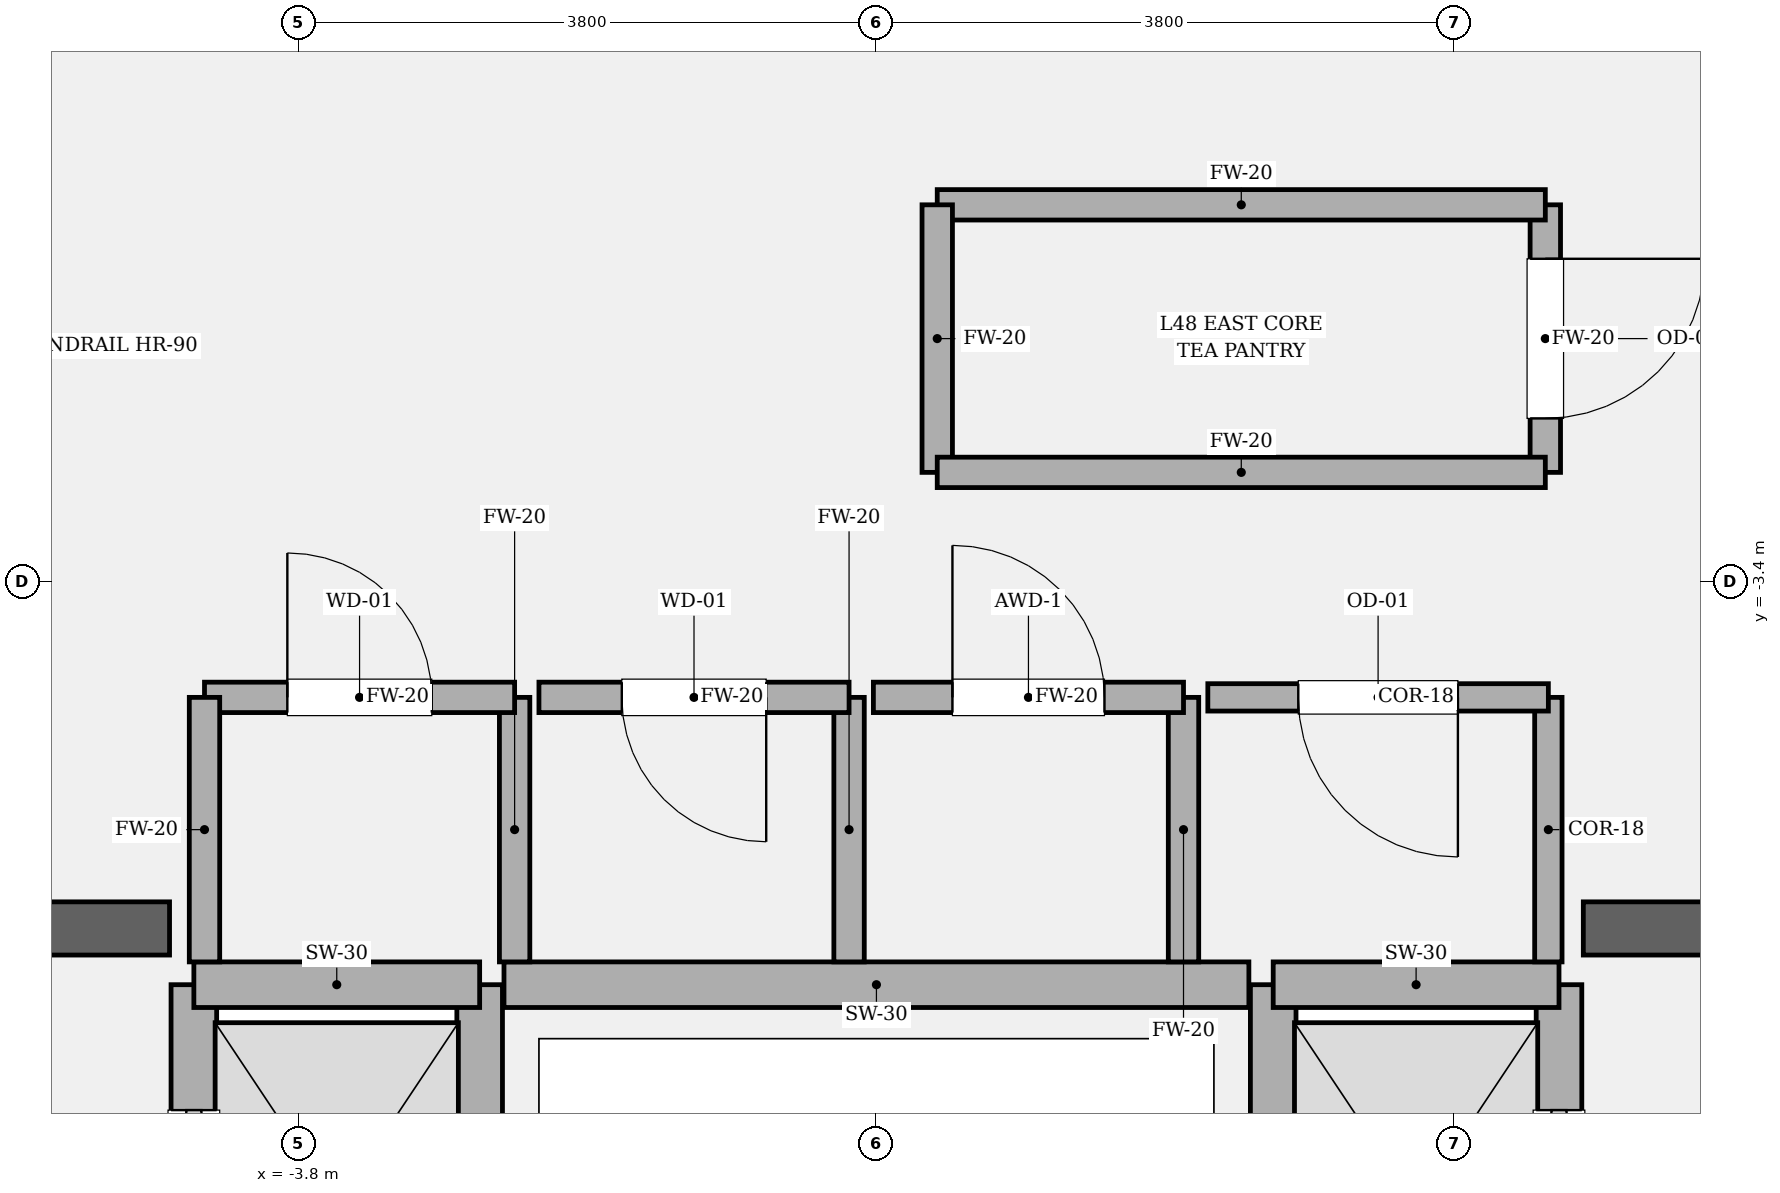
"""IFC4 building model, lengths in metres.
Left out: names, types, materials, properties, quantities, classifications, styles, units other than length and angle.
Written with IfcOpenShell. Run it as: python <this file> out.ifc"""

import sys

from ifc_helpers import new_model, si_unit, direction, frame, frame_2d, origin, place, context, subcontext, project, spatial, rectangle, extrude, element, fill, save


model = new_model("IFC4")
c1 = context("Model", 3, precision=1e-05, world=origin(), true_north=direction((0.0, 1.0)))
c2 = subcontext(c1, "Body", "Model", "MODEL_VIEW")
j1 = project(units=[si_unit("LENGTHUNIT", "METRE"), si_unit("PLANEANGLEUNIT", "RADIAN")], contexts=[c1])
p1 = place(None, origin())
s1 = spatial("IfcSite", under=j1, at=p1, CompositionType="ELEMENT")
p2 = place(p1, origin())
s2 = spatial("IfcBuilding", under=s1, at=p2, CompositionType="ELEMENT")
p3 = place(p2, frame((0.0, 0.0, 204.6)))
s3 = spatial("IfcBuildingStorey", under=s2, at=p3, CompositionType="ELEMENT", Elevation=204.6)
p4 = place(p3, frame((-9.875, -5.68, 0.0), z_axis=(0.0, 0.0, 1.0), x_axis=(1.0, 0.0, 0.0)))
e1 = element("IfcWall", 1, at=p4, inside=s3, PredefinedType="SOLIDWALL", context=c2, shape_type="SweptSolid", body=[
    extrude(rectangle(XDim=5.225, YDim=0.35, at=frame_2d((2.613, 0.0))), origin(), (0.0, 0.0, 1.0), 4.05),
])
p5 = place(p4, frame((1.335, 0.0, 0.0)))
e2 = element("IfcOpeningElement", 2, at=p5, cuts=e1, PredefinedType="OPENING", context=c2, shape_type="SweptSolid", body=[
    extrude(rectangle(XDim=1.18, YDim=2.2, at=frame_2d((0.59, 1.1))), frame((0.0, 0.185, 0.0), z_axis=(0.0, -1.0, 0.0), x_axis=(1.0, 0.0, 0.0)), (0.0, 0.0, 1.0), 0.37),
])
p6 = place(p3, frame((4.65, -5.68, 0.0), z_axis=(0.0, 0.0, 1.0), x_axis=(1.0, 0.0, 0.0)))
e3 = element("IfcWall", 3, at=p6, inside=s3, PredefinedType="SOLIDWALL", context=c2, shape_type="SweptSolid", body=[
    extrude(rectangle(XDim=5.225, YDim=0.35, at=frame_2d((2.613, 0.0))), origin(), (0.0, 0.0, 1.0), 4.05),
])
p7 = place(p6, frame((2.71, 0.0, 0.0)))
e4 = element("IfcOpeningElement", 4, at=p7, cuts=e3, PredefinedType="OPENING", context=c2, shape_type="SweptSolid", body=[
    extrude(rectangle(XDim=1.18, YDim=2.2, at=frame_2d((0.59, 1.1))), frame((0.0, 0.185, 0.0), z_axis=(0.0, -1.0, 0.0), x_axis=(1.0, 0.0, 0.0)), (0.0, 0.0, 1.0), 0.37),
])
p8 = place(p3, frame((-4.49, -8.82, 0.0), z_axis=(0.0, 0.0, 1.0), x_axis=(0.0, 1.0, 0.0)))
e5 = element("IfcWall", 5, at=p8, inside=s3, PredefinedType="SOLIDWALL", context=c2, shape_type="SweptSolid", body=[
    extrude(rectangle(XDim=2.77, YDim=0.3, at=frame_2d((1.385, 0.0))), origin(), (0.0, 0.0, 1.0), 3.83),
])
p9 = place(p8, frame((0.825, 0.0, 0.0)))
e6 = element("IfcOpeningElement", 6, at=p9, cuts=e5, PredefinedType="OPENING", context=c2, shape_type="SweptSolid", body=[
    extrude(rectangle(XDim=1.12, YDim=2.25, at=frame_2d((0.56, 1.125))), frame((0.0, 0.16, 0.0), z_axis=(0.0, -1.0, 0.0), x_axis=(1.0, 0.0, 0.0)), (0.0, 0.0, 1.0), 0.32),
])
p10 = place(p3, frame((-2.61, -8.82, 0.0), z_axis=(0.0, 0.0, 1.0), x_axis=(0.0, 1.0, 0.0)))
e7 = element("IfcWall", 7, at=p10, inside=s3, PredefinedType="SOLIDWALL", context=c2, shape_type="SweptSolid", body=[
    extrude(rectangle(XDim=2.77, YDim=0.3, at=frame_2d((1.385, 0.0))), origin(), (0.0, 0.0, 1.0), 3.83),
])
p11 = place(p3, frame((-4.49, -6.05, 0.0), z_axis=(0.0, 0.0, 1.0), x_axis=(1.0, 0.0, 0.0)))
e8 = element("IfcWall", 8, at=p11, inside=s3, PredefinedType="SOLIDWALL", context=c2, shape_type="SweptSolid", body=[
    extrude(rectangle(XDim=1.88, YDim=0.3, at=frame_2d((0.94, 0.0))), origin(), (0.0, 0.0, 1.0), 3.83),
])
p12 = place(p3, frame((4.49, -8.82, 0.0), z_axis=(0.0, 0.0, 1.0), x_axis=(0.0, 1.0, 0.0)))
e9 = element("IfcWall", 9, at=p12, inside=s3, PredefinedType="SOLIDWALL", context=c2, shape_type="SweptSolid", body=[
    extrude(rectangle(XDim=2.77, YDim=0.3, at=frame_2d((1.385, 0.0))), origin(), (0.0, 0.0, 1.0), 3.83),
])
p13 = place(p12, frame((0.825, 0.0, 0.0)))
e10 = element("IfcOpeningElement", 10, at=p13, cuts=e9, PredefinedType="OPENING", context=c2, shape_type="SweptSolid", body=[
    extrude(rectangle(XDim=1.12, YDim=2.25, at=frame_2d((0.56, 1.125))), frame((0.0, 0.16, 0.0), z_axis=(0.0, -1.0, 0.0), x_axis=(1.0, 0.0, 0.0)), (0.0, 0.0, 1.0), 0.32),
])
p14 = place(p3, frame((2.61, -8.82, 0.0), z_axis=(0.0, 0.0, 1.0), x_axis=(0.0, 1.0, 0.0)))
e11 = element("IfcWall", 11, at=p14, inside=s3, PredefinedType="SOLIDWALL", context=c2, shape_type="SweptSolid", body=[
    extrude(rectangle(XDim=2.77, YDim=0.3, at=frame_2d((1.385, 0.0))), origin(), (0.0, 0.0, 1.0), 3.83),
])
p15 = place(p3, frame((2.61, -6.05, 0.0), z_axis=(0.0, 0.0, 1.0), x_axis=(1.0, 0.0, 0.0)))
e12 = element("IfcWall", 12, at=p15, inside=s3, PredefinedType="SOLIDWALL", context=c2, shape_type="SweptSolid", body=[
    extrude(rectangle(XDim=1.88, YDim=0.3, at=frame_2d((0.94, 0.0))), origin(), (0.0, 0.0, 1.0), 3.83),
])
p16 = place(p3, frame((-2.45, -6.05, 0.0), z_axis=(0.0, 0.0, 1.0), x_axis=(1.0, 0.0, 0.0)))
e13 = element("IfcWall", 13, at=p16, inside=s3, PredefinedType="SOLIDWALL", context=c2, shape_type="SweptSolid", body=[
    extrude(rectangle(XDim=4.9, YDim=0.3, at=frame_2d((2.45, 0.0))), origin(), (0.0, 0.0, 1.0), 3.83),
])
p17 = place(p3, frame((-2.38, -5.9, 0.0), z_axis=(0.0, 0.0, 1.0), x_axis=(0.0, 1.0, 0.0)))
e14 = element("IfcWall", 14, at=p17, inside=s3, PredefinedType="SOLIDWALL", context=c2, shape_type="SweptSolid", body=[
    extrude(rectangle(XDim=1.74, YDim=0.2, at=frame_2d((0.87, 0.0))), origin(), (0.0, 0.0, 1.0), 3.83),
])
p18 = place(p3, frame((-2.38, -4.16, 0.0), z_axis=(0.0, 0.0, 1.0), x_axis=(-1.0, 0.0, 0.0)))
e15 = element("IfcWall", 15, at=p18, inside=s3, PredefinedType="SOLIDWALL", context=c2, shape_type="SweptSolid", body=[
    extrude(rectangle(XDim=2.04, YDim=0.2, at=frame_2d((1.02, 0.0))), origin(), (0.0, 0.0, 1.0), 3.83),
])
p19 = place(p18, frame((0.545, 0.0, 0.0)))
e16 = element("IfcOpeningElement", 16, at=p19, cuts=e15, PredefinedType="OPENING", context=c2, shape_type="SweptSolid", body=[
    extrude(rectangle(XDim=0.95, YDim=2.15, at=frame_2d((0.475, 1.075))), frame((0.0, 0.11, 0.0), z_axis=(0.0, -1.0, 0.0), x_axis=(1.0, 0.0, 0.0)), (0.0, 0.0, 1.0), 0.22),
])
for number, where, z_axis, x_axis in (
    (17, (-4.42, -4.16, 0.0), (0.0, 0.0, 1.0), (0.0, -1.0, 0.0)),
    (18, (-0.18, -5.9, 0.0), (0.0, 0.0, 1.0), (0.0, 1.0, 0.0)),
):
    element("IfcWall", number, at=place(p3, frame(where, z_axis=z_axis, x_axis=x_axis)), inside=s3, PredefinedType="SOLIDWALL", context=c2, shape_type="SweptSolid", body=[
        extrude(rectangle(XDim=1.74, YDim=0.2, at=frame_2d((0.87, 0.0))), origin(), (0.0, 0.0, 1.0), 3.83),
    ])
p20 = place(p3, frame((-0.18, -4.16, 0.0), z_axis=(0.0, 0.0, 1.0), x_axis=(-1.0, 0.0, 0.0)))
e19 = element("IfcWall", 19, at=p20, inside=s3, PredefinedType="SOLIDWALL", context=c2, shape_type="SweptSolid", body=[
    extrude(rectangle(XDim=2.04, YDim=0.2, at=frame_2d((1.02, 0.0))), origin(), (0.0, 0.0, 1.0), 3.83),
])
p21 = place(p20, frame((0.545, 0.0, 0.0)))
e20 = element("IfcOpeningElement", 20, at=p21, cuts=e19, PredefinedType="OPENING", context=c2, shape_type="SweptSolid", body=[
    extrude(rectangle(XDim=0.95, YDim=2.15, at=frame_2d((0.475, 1.075))), frame((0.0, 0.11, 0.0), z_axis=(0.0, -1.0, 0.0), x_axis=(1.0, 0.0, 0.0)), (0.0, 0.0, 1.0), 0.22),
])
p22 = place(p3, frame((2.02, -5.9, 0.0), z_axis=(0.0, 0.0, 1.0), x_axis=(0.0, 1.0, 0.0)))
e21 = element("IfcWall", 21, at=p22, inside=s3, PredefinedType="SOLIDWALL", context=c2, shape_type="SweptSolid", body=[
    extrude(rectangle(XDim=1.74, YDim=0.2, at=frame_2d((0.87, 0.0))), origin(), (0.0, 0.0, 1.0), 3.83),
])
p23 = place(p3, frame((2.02, -4.16, 0.0), z_axis=(0.0, 0.0, 1.0), x_axis=(-1.0, 0.0, 0.0)))
e22 = element("IfcWall", 22, at=p23, inside=s3, PredefinedType="SOLIDWALL", context=c2, shape_type="SweptSolid", body=[
    extrude(rectangle(XDim=2.04, YDim=0.2, at=frame_2d((1.02, 0.0))), origin(), (0.0, 0.0, 1.0), 3.83),
])
p24 = place(p23, frame((0.52, 0.0, 0.0)))
e23 = element("IfcOpeningElement", 23, at=p24, cuts=e22, PredefinedType="OPENING", context=c2, shape_type="SweptSolid", body=[
    extrude(rectangle(XDim=1.0, YDim=2.15, at=frame_2d((0.5, 1.075))), frame((0.0, 0.11, 0.0), z_axis=(0.0, -1.0, 0.0), x_axis=(1.0, 0.0, 0.0)), (0.0, 0.0, 1.0), 0.22),
])
p25 = place(p3, frame((4.42, -5.9, 0.0), z_axis=(0.0, 0.0, 1.0), x_axis=(0.0, 1.0, 0.0)))
e24 = element("IfcWall", 24, at=p25, inside=s3, PredefinedType="PARTITIONING", context=c2, shape_type="SweptSolid", body=[
    extrude(rectangle(XDim=1.74, YDim=0.18, at=frame_2d((0.87, 0.0))), origin(), (0.0, 0.0, 1.0), 3.83),
])
p26 = place(p3, frame((4.42, -4.16, 0.0), z_axis=(0.0, 0.0, 1.0), x_axis=(-1.0, 0.0, 0.0)))
e25 = element("IfcWall", 25, at=p26, inside=s3, PredefinedType="PARTITIONING", context=c2, shape_type="SweptSolid", body=[
    extrude(rectangle(XDim=2.24, YDim=0.18, at=frame_2d((1.12, 0.0))), origin(), (0.0, 0.0, 1.0), 3.83),
])
p27 = place(p26, frame((0.595, 0.0, 0.0)))
e26 = element("IfcOpeningElement", 26, at=p27, cuts=e25, PredefinedType="OPENING", context=c2, shape_type="SweptSolid", body=[
    extrude(rectangle(XDim=1.05, YDim=2.2, at=frame_2d((0.525, 1.1))), frame((0.0, 0.1, 0.0), z_axis=(0.0, -1.0, 0.0), x_axis=(1.0, 0.0, 0.0)), (0.0, 0.0, 1.0), 0.2),
])
p28 = place(p3, frame((4.4, -2.68, 0.0), z_axis=(0.0, 0.0, 1.0), x_axis=(0.0, 1.0, 0.0)))
e27 = element("IfcWall", 27, at=p28, inside=s3, PredefinedType="SOLIDWALL", context=c2, shape_type="SweptSolid", body=[
    extrude(rectangle(XDim=1.76, YDim=0.2, at=frame_2d((0.88, 0.0))), origin(), (0.0, 0.0, 1.0), 3.83),
])
p29 = place(p28, frame((0.355, 0.0, 0.0)))
e28 = element("IfcOpeningElement", 28, at=p29, cuts=e27, PredefinedType="OPENING", context=c2, shape_type="SweptSolid", body=[
    extrude(rectangle(XDim=1.05, YDim=2.2, at=frame_2d((0.525, 1.1))), frame((0.0, 0.11, 0.0), z_axis=(0.0, -1.0, 0.0), x_axis=(1.0, 0.0, 0.0)), (0.0, 0.0, 1.0), 0.22),
])
p30 = place(p3, frame((4.4, -0.92, 0.0), z_axis=(0.0, 0.0, 1.0), x_axis=(-1.0, 0.0, 0.0)))
e29 = element("IfcWall", 29, at=p30, inside=s3, PredefinedType="SOLIDWALL", context=c2, shape_type="SweptSolid", body=[
    extrude(rectangle(XDim=4.0, YDim=0.2, at=frame_2d((2.0, 0.0))), origin(), (0.0, 0.0, 1.0), 3.83),
])
p31 = place(p3, frame((0.4, -0.92, 0.0), z_axis=(0.0, 0.0, 1.0), x_axis=(0.0, -1.0, 0.0)))
e30 = element("IfcWall", 30, at=p31, inside=s3, PredefinedType="SOLIDWALL", context=c2, shape_type="SweptSolid", body=[
    extrude(rectangle(XDim=1.76, YDim=0.2, at=frame_2d((0.88, 0.0))), origin(), (0.0, 0.0, 1.0), 3.83),
])
p32 = place(p3, frame((0.4, -2.68, 0.0), z_axis=(0.0, 0.0, 1.0), x_axis=(1.0, 0.0, 0.0)))
e31 = element("IfcWall", 31, at=p32, inside=s3, PredefinedType="SOLIDWALL", context=c2, shape_type="SweptSolid", body=[
    extrude(rectangle(XDim=4.0, YDim=0.2, at=frame_2d((2.0, 0.0))), origin(), (0.0, 0.0, 1.0), 3.83),
])
p33 = place(p9, origin())
e32 = element("IfcDoor", 32, at=p33, inside=s3, OperationType="SLIDING_TO_LEFT", PredefinedType="DOOR", context=c2, shape_type="SweptSolid", body=[
    extrude(rectangle(XDim=1.12, YDim=2.25, at=frame_2d((0.56, 1.125))), frame((0.0, 0.025, 0.0), z_axis=(0.0, -1.0, 0.0), x_axis=(1.0, 0.0, 0.0)), (0.0, 0.0, 1.0), 0.05),
])
fill(e6, e32)
p34 = place(p13, origin())
e33 = element("IfcDoor", 33, at=p34, inside=s3, OperationType="SLIDING_TO_RIGHT", PredefinedType="DOOR", context=c2, shape_type="SweptSolid", body=[
    extrude(rectangle(XDim=1.12, YDim=2.25, at=frame_2d((0.56, 1.125))), frame((0.0, 0.025, 0.0), z_axis=(0.0, -1.0, 0.0), x_axis=(1.0, 0.0, 0.0)), (0.0, 0.0, 1.0), 0.05),
])
fill(e10, e33)
p35 = place(p19, origin())
e34 = element("IfcDoor", 34, at=p35, inside=s3, OperationType="SINGLE_SWING_RIGHT", PredefinedType="DOOR", context=c2, shape_type="SweptSolid", body=[
    extrude(rectangle(XDim=0.95, YDim=2.15, at=frame_2d((0.475, 1.075))), frame((0.0, 0.025, 0.0), z_axis=(0.0, -1.0, 0.0), x_axis=(1.0, 0.0, 0.0)), (0.0, 0.0, 1.0), 0.05),
])
fill(e16, e34)
p36 = place(p21, origin())
e35 = element("IfcDoor", 35, at=p36, inside=s3, OperationType="SINGLE_SWING_LEFT", PredefinedType="DOOR", context=c2, shape_type="SweptSolid", body=[
    extrude(rectangle(XDim=0.95, YDim=2.15, at=frame_2d((0.475, 1.075))), frame((0.0, 0.025, 0.0), z_axis=(0.0, -1.0, 0.0), x_axis=(1.0, 0.0, 0.0)), (0.0, 0.0, 1.0), 0.05),
])
fill(e20, e35)
p37 = place(p24, origin())
e36 = element("IfcDoor", 36, at=p37, inside=s3, OperationType="SINGLE_SWING_RIGHT", PredefinedType="DOOR", context=c2, shape_type="SweptSolid", body=[
    extrude(rectangle(XDim=1.0, YDim=2.15, at=frame_2d((0.5, 1.075))), frame((0.0, 0.025, 0.0), z_axis=(0.0, -1.0, 0.0), x_axis=(1.0, 0.0, 0.0)), (0.0, 0.0, 1.0), 0.05),
])
fill(e23, e36)
p38 = place(p27, origin())
e37 = element("IfcDoor", 37, at=p38, inside=s3, OperationType="SINGLE_SWING_LEFT", PredefinedType="DOOR", context=c2, shape_type="SweptSolid", body=[
    extrude(rectangle(XDim=1.05, YDim=2.2, at=frame_2d((0.525, 1.1))), frame((0.0, 0.025, 0.0), z_axis=(0.0, -1.0, 0.0), x_axis=(1.0, 0.0, 0.0)), (0.0, 0.0, 1.0), 0.05),
])
fill(e26, e37)
p39 = place(p29, origin())
e38 = element("IfcDoor", 38, at=p39, inside=s3, OperationType="SINGLE_SWING_RIGHT", PredefinedType="DOOR", context=c2, shape_type="SweptSolid", body=[
    extrude(rectangle(XDim=1.05, YDim=2.2, at=frame_2d((0.525, 1.1))), frame((0.0, 0.025, 0.0), z_axis=(0.0, -1.0, 0.0), x_axis=(1.0, 0.0, 0.0)), (0.0, 0.0, 1.0), 0.05),
])
fill(e28, e38)
save(model, sys.argv[1])
